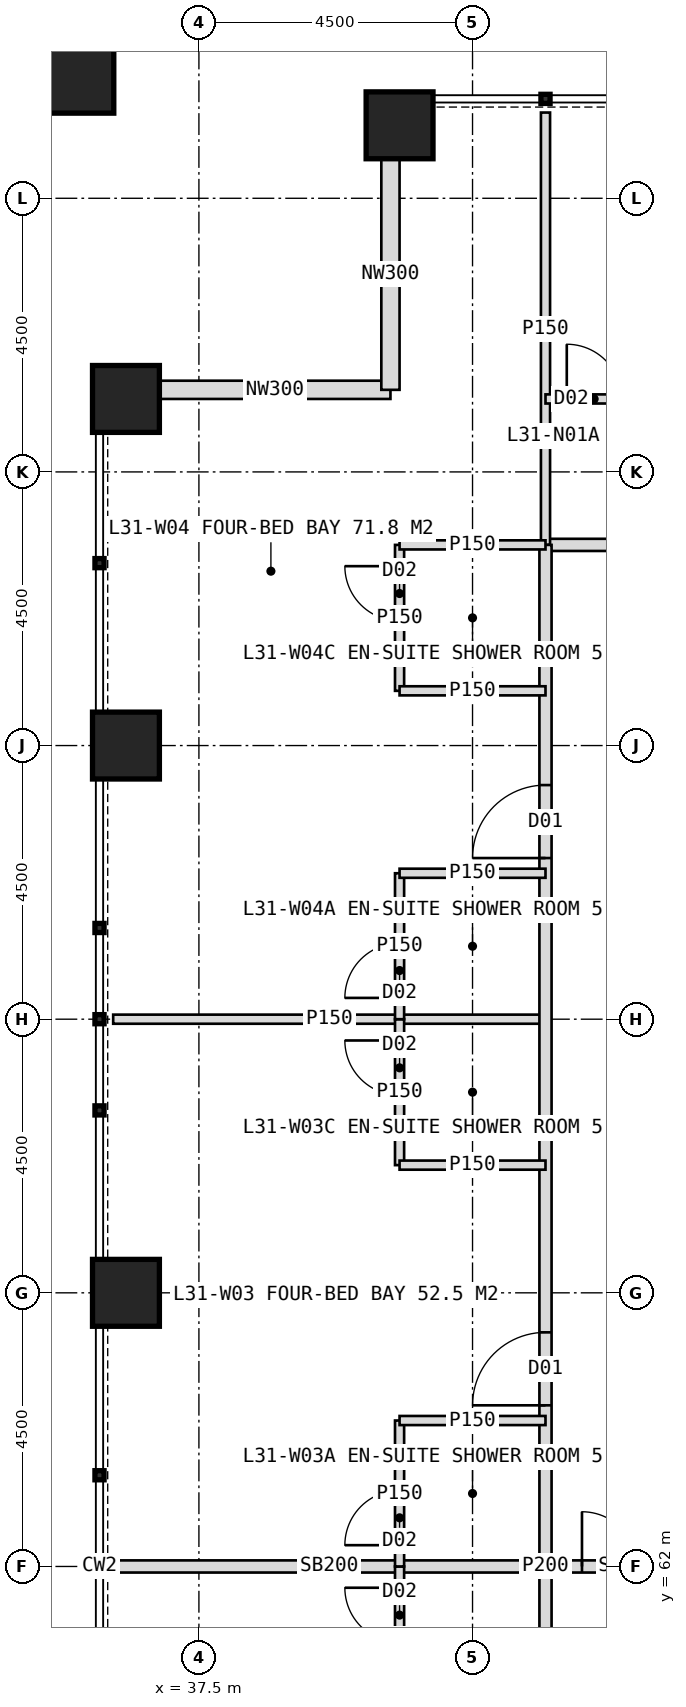
"""IFC4 building model, lengths in metres.
Left out: names, types, materials, properties, quantities, classifications, styles, units other than length and angle.
Written with IfcOpenShell. Run it as: python <this file> out.ifc"""

import sys

from ifc_helpers import new_model, si_unit, direction, frame, frame_2d, origin, origin_2d, place, context, subcontext, project, spatial, rectangle, hollow_rectangle, extrude, element, fill, save


model = new_model("IFC4")
c1 = context("Model", 3, precision=1e-05, world=origin(), true_north=direction((0.0, 1.0)))
c2 = subcontext(c1, "Body", "Model", "MODEL_VIEW")
j1 = project(units=[si_unit("LENGTHUNIT", "METRE"), si_unit("PLANEANGLEUNIT", "RADIAN")], contexts=[c1])
p1 = place(None, origin())
s1 = spatial("IfcSite", under=j1, at=p1, CompositionType="ELEMENT")
p2 = place(p1, origin())
s2 = spatial("IfcBuilding", under=s1, at=p2, CompositionType="ELEMENT")
p3 = place(p2, frame((0.0, 0.0, 132.0)))
s3 = spatial("IfcBuildingStorey", under=s2, at=p3, CompositionType="ELEMENT", Elevation=132.0)
for number, where, z_axis, x_axis in (
    (1, (40.8, 85.7, 0.0), (0.0, 0.0, 1.0), (1.0, 0.0, 0.0)),
    (2, (36.3, 66.5, 0.0), (0.0, 0.0, 1.0), (1.0, 0.0, 0.0)),
    (3, (36.3, 75.5, 0.0), (0.0, 0.0, 1.0), (1.0, 0.0, 0.0)),
    (4, (36.3, 81.2, 0.0), (0.0, 0.0, 1.0), (1.0, 0.0, 0.0)),
):
    element("IfcColumn", number, at=place(p3, frame(where, z_axis=z_axis, x_axis=x_axis)), inside=s3, PredefinedType="COLUMN", context=c2, shape_type="SweptSolid", body=[
        extrude(hollow_rectangle(XDim=1.1, YDim=1.1, WallThickness=0.1, at=origin_2d()), origin(), (0.0, 0.0, 1.0), 4.0),
    ])
p4 = place(p3, frame((35.4, 86.6, 0.0), z_axis=(0.0, 0.0, 1.0), x_axis=(1.0, 0.0, 0.0)))
e5 = element("IfcColumn", 5, at=p4, inside=s3, PredefinedType="COLUMN", context=c2, shape_type="SweptSolid", body=[
    extrude(hollow_rectangle(XDim=1.4, YDim=1.4, WallThickness=0.08, at=origin_2d()), origin(), (0.0, 0.0, 1.0), 4.0),
])
for number, where, z_axis, x_axis in (
    (6, (36.85, 81.35, 0.0), (0.0, 0.0, 1.0), (1.0, 0.0, 0.0)),
    (7, (40.65, 81.35, 0.0), (0.0, 0.0, 1.0), (0.0, 1.0, 0.0)),
):
    element("IfcWall", number, at=place(p3, frame(where, z_axis=z_axis, x_axis=x_axis)), inside=s3, PredefinedType="ELEMENTEDWALL", context=c2, shape_type="SweptSolid", body=[
        extrude(rectangle(XDim=3.8, YDim=0.3, at=frame_2d((1.9, 0.0))), origin(), (0.0, 0.0, 1.0), 4.0),
    ])
p5 = place(p3, frame((43.2, 78.8, 0.0), z_axis=(0.0, 0.0, 1.0), x_axis=(1.0, 0.0, 0.0)))
e8 = element("IfcWall", 8, at=p5, inside=s3, PredefinedType="PARTITIONING", context=c2, shape_type="SweptSolid", body=[
    extrude(rectangle(XDim=33.6, YDim=0.2, at=frame_2d((16.8, 0.0))), origin(), (0.0, 0.0, 1.0), 3.75),
])
p6 = place(p5, frame((3.25, 0.0, 0.0)))
e9 = element("IfcOpeningElement", 9, at=p6, cuts=e8, PredefinedType="OPENING", context=c2, shape_type="SweptSolid", body=[
    extrude(rectangle(XDim=1.2, YDim=2.2, at=frame_2d((0.6, 1.1))), frame((0.0, 0.11, 0.0), z_axis=(0.0, -1.0, 0.0), x_axis=(1.0, 0.0, 0.0)), (0.0, 0.0, 1.0), 0.22),
])
p7 = place(p5, frame((12.55, 0.0, 0.0)))
e10 = element("IfcOpeningElement", 10, at=p7, cuts=e8, PredefinedType="OPENING", context=c2, shape_type="SweptSolid", body=[
    extrude(rectangle(XDim=1.2, YDim=2.2, at=frame_2d((0.6, 1.1))), frame((0.0, 0.11, 0.0), z_axis=(0.0, -1.0, 0.0), x_axis=(1.0, 0.0, 0.0)), (0.0, 0.0, 1.0), 0.22),
])
p8 = place(p5, frame((26.95, 0.0, 0.0)))
e11 = element("IfcOpeningElement", 11, at=p8, cuts=e8, PredefinedType="OPENING", context=c2, shape_type="SweptSolid", body=[
    extrude(rectangle(XDim=1.2, YDim=2.2, at=frame_2d((0.6, 1.1))), frame((0.0, 0.11, 0.0), z_axis=(0.0, -1.0, 0.0), x_axis=(1.0, 0.0, 0.0)), (0.0, 0.0, 1.0), 0.22),
])
p9 = place(p3, frame((43.2, 78.8, 0.0), z_axis=(0.0, 0.0, 1.0), x_axis=(0.0, 1.0, 0.0)))
e12 = element("IfcWall", 12, at=p9, inside=s3, PredefinedType="PARTITIONING", context=c2, shape_type="SweptSolid", body=[
    extrude(rectangle(XDim=7.11, YDim=0.15, at=frame_2d((3.555, 0.0))), origin(), (0.0, 0.0, 1.0), 3.75),
])
p10 = place(p3, frame((43.2, 81.2, 0.0), z_axis=(0.0, 0.0, 1.0), x_axis=(1.0, 0.0, 0.0)))
e13 = element("IfcWall", 13, at=p10, inside=s3, PredefinedType="PARTITIONING", context=c2, shape_type="SweptSolid", body=[
    extrude(rectangle(XDim=3.0, YDim=0.15, at=frame_2d((1.5, 0.0))), origin(), (0.0, 0.0, 1.0), 2.997),
])
p11 = place(p10, frame((0.35, 0.0, 0.0)))
e14 = element("IfcOpeningElement", 14, at=p11, cuts=e13, PredefinedType="OPENING", context=c2, shape_type="SweptSolid", body=[
    extrude(rectangle(XDim=0.9, YDim=2.1, at=frame_2d((0.45, 1.05))), frame((0.0, 0.085, 0.0), z_axis=(0.0, -1.0, 0.0), x_axis=(1.0, 0.0, 0.0)), (0.0, 0.0, 1.0), 0.17),
])
p12 = place(p3, frame((43.2, 62.0, 0.0), z_axis=(0.0, 0.0, 1.0), x_axis=(-1.0, 0.0, 0.0)))
e15 = element("IfcWall", 15, at=p12, inside=s3, PredefinedType="SOLIDWALL", context=c2, shape_type="SweptSolid", body=[
    extrude(rectangle(XDim=7.11, YDim=0.2, at=frame_2d((3.555, 0.0))), origin(), (0.0, 0.0, 1.0), 2.95),
])
p13 = place(p3, frame((43.2, 71.0, 0.0), z_axis=(0.0, 0.0, 1.0), x_axis=(-1.0, 0.0, 0.0)))
e16 = element("IfcWall", 16, at=p13, inside=s3, PredefinedType="PARTITIONING", context=c2, shape_type="SweptSolid", body=[
    extrude(rectangle(XDim=7.11, YDim=0.15, at=frame_2d((3.555, 0.0))), origin(), (0.0, 0.0, 1.0), 3.75),
])
p14 = place(p3, frame((43.2, 45.2, 0.0), z_axis=(0.0, 0.0, 1.0), x_axis=(0.0, 1.0, 0.0)))
e17 = element("IfcWall", 17, at=p14, inside=s3, PredefinedType="PARTITIONING", context=c2, shape_type="SweptSolid", body=[
    extrude(rectangle(XDim=33.6, YDim=0.2, at=frame_2d((16.8, 0.0))), origin(), (0.0, 0.0, 1.0), 3.75),
])
p15 = place(p14, frame((2.65, 0.0, 0.0)))
e18 = element("IfcOpeningElement", 18, at=p15, cuts=e17, PredefinedType="OPENING", context=c2, shape_type="SweptSolid", body=[
    extrude(rectangle(XDim=1.2, YDim=2.2, at=frame_2d((0.6, 1.1))), frame((0.0, 0.11, 0.0), z_axis=(0.0, -1.0, 0.0), x_axis=(1.0, 0.0, 0.0)), (0.0, 0.0, 1.0), 0.22),
])
p16 = place(p14, frame((8.95, 0.0, 0.0)))
e19 = element("IfcOpeningElement", 19, at=p16, cuts=e17, PredefinedType="OPENING", context=c2, shape_type="SweptSolid", body=[
    extrude(rectangle(XDim=1.2, YDim=2.2, at=frame_2d((0.6, 1.1))), frame((0.0, 0.11, 0.0), z_axis=(0.0, -1.0, 0.0), x_axis=(1.0, 0.0, 0.0)), (0.0, 0.0, 1.0), 0.22),
])
p17 = place(p14, frame((19.45, 0.0, 0.0)))
e20 = element("IfcOpeningElement", 20, at=p17, cuts=e17, PredefinedType="OPENING", context=c2, shape_type="SweptSolid", body=[
    extrude(rectangle(XDim=1.2, YDim=2.2, at=frame_2d((0.6, 1.1))), frame((0.0, 0.11, 0.0), z_axis=(0.0, -1.0, 0.0), x_axis=(1.0, 0.0, 0.0)), (0.0, 0.0, 1.0), 0.22),
])
p18 = place(p14, frame((28.45, 0.0, 0.0)))
e21 = element("IfcOpeningElement", 21, at=p18, cuts=e17, PredefinedType="OPENING", context=c2, shape_type="SweptSolid", body=[
    extrude(rectangle(XDim=1.2, YDim=2.2, at=frame_2d((0.6, 1.1))), frame((0.0, 0.11, 0.0), z_axis=(0.0, -1.0, 0.0), x_axis=(1.0, 0.0, 0.0)), (0.0, 0.0, 1.0), 0.22),
])
p19 = place(p3, frame((40.8, 59.6, 0.0), z_axis=(0.0, 0.0, 1.0), x_axis=(0.0, 1.0, 0.0)))
e22 = element("IfcWall", 22, at=p19, inside=s3, PredefinedType="PARTITIONING", context=c2, shape_type="SweptSolid", body=[
    extrude(rectangle(XDim=2.4, YDim=0.15, at=frame_2d((1.2, 0.0))), origin(), (0.0, 0.0, 1.0), 3.75),
])
p20 = place(p19, frame((1.15, 0.0, 0.0)))
e23 = element("IfcOpeningElement", 23, at=p20, cuts=e22, PredefinedType="OPENING", context=c2, shape_type="SweptSolid", body=[
    extrude(rectangle(XDim=0.9, YDim=2.1, at=frame_2d((0.45, 1.05))), frame((0.0, 0.085, 0.0), z_axis=(0.0, -1.0, 0.0), x_axis=(1.0, 0.0, 0.0)), (0.0, 0.0, 1.0), 0.17),
])
p21 = place(p3, frame((40.8, 62.0, 0.0), z_axis=(0.0, 0.0, 1.0), x_axis=(0.0, 1.0, 0.0)))
e24 = element("IfcWall", 24, at=p21, inside=s3, PredefinedType="PARTITIONING", context=c2, shape_type="SweptSolid", body=[
    extrude(rectangle(XDim=2.4, YDim=0.15, at=frame_2d((1.2, 0.0))), origin(), (0.0, 0.0, 1.0), 3.75),
])
p22 = place(p21, frame((0.35, 0.0, 0.0)))
e25 = element("IfcOpeningElement", 25, at=p22, cuts=e24, PredefinedType="OPENING", context=c2, shape_type="SweptSolid", body=[
    extrude(rectangle(XDim=0.9, YDim=2.1, at=frame_2d((0.45, 1.05))), frame((0.0, 0.085, 0.0), z_axis=(0.0, -1.0, 0.0), x_axis=(1.0, 0.0, 0.0)), (0.0, 0.0, 1.0), 0.17),
])
p23 = place(p3, frame((43.2, 64.4, 0.0), z_axis=(0.0, 0.0, 1.0), x_axis=(-1.0, 0.0, 0.0)))
e26 = element("IfcWall", 26, at=p23, inside=s3, PredefinedType="PARTITIONING", context=c2, shape_type="SweptSolid", body=[
    extrude(rectangle(XDim=2.4, YDim=0.15, at=frame_2d((1.2, 0.0))), origin(), (0.0, 0.0, 1.0), 3.75),
])
p24 = place(p3, frame((40.8, 68.6, 0.0), z_axis=(0.0, 0.0, 1.0), x_axis=(0.0, 1.0, 0.0)))
e27 = element("IfcWall", 27, at=p24, inside=s3, PredefinedType="PARTITIONING", context=c2, shape_type="SweptSolid", body=[
    extrude(rectangle(XDim=2.4, YDim=0.15, at=frame_2d((1.2, 0.0))), origin(), (0.0, 0.0, 1.0), 3.75),
])
p25 = place(p24, frame((1.15, 0.0, 0.0)))
e28 = element("IfcOpeningElement", 28, at=p25, cuts=e27, PredefinedType="OPENING", context=c2, shape_type="SweptSolid", body=[
    extrude(rectangle(XDim=0.9, YDim=2.1, at=frame_2d((0.45, 1.05))), frame((0.0, 0.085, 0.0), z_axis=(0.0, -1.0, 0.0), x_axis=(1.0, 0.0, 0.0)), (0.0, 0.0, 1.0), 0.17),
])
p26 = place(p3, frame((43.2, 68.6, 0.0), z_axis=(0.0, 0.0, 1.0), x_axis=(-1.0, 0.0, 0.0)))
e29 = element("IfcWall", 29, at=p26, inside=s3, PredefinedType="PARTITIONING", context=c2, shape_type="SweptSolid", body=[
    extrude(rectangle(XDim=2.4, YDim=0.15, at=frame_2d((1.2, 0.0))), origin(), (0.0, 0.0, 1.0), 3.75),
])
p27 = place(p3, frame((40.8, 71.0, 0.0), z_axis=(0.0, 0.0, 1.0), x_axis=(0.0, 1.0, 0.0)))
e30 = element("IfcWall", 30, at=p27, inside=s3, PredefinedType="PARTITIONING", context=c2, shape_type="SweptSolid", body=[
    extrude(rectangle(XDim=2.4, YDim=0.15, at=frame_2d((1.2, 0.0))), origin(), (0.0, 0.0, 1.0), 3.75),
])
p28 = place(p27, frame((0.35, 0.0, 0.0)))
e31 = element("IfcOpeningElement", 31, at=p28, cuts=e30, PredefinedType="OPENING", context=c2, shape_type="SweptSolid", body=[
    extrude(rectangle(XDim=0.9, YDim=2.1, at=frame_2d((0.45, 1.05))), frame((0.0, 0.085, 0.0), z_axis=(0.0, -1.0, 0.0), x_axis=(1.0, 0.0, 0.0)), (0.0, 0.0, 1.0), 0.17),
])
p29 = place(p3, frame((43.2, 73.4, 0.0), z_axis=(0.0, 0.0, 1.0), x_axis=(-1.0, 0.0, 0.0)))
e32 = element("IfcWall", 32, at=p29, inside=s3, PredefinedType="PARTITIONING", context=c2, shape_type="SweptSolid", body=[
    extrude(rectangle(XDim=2.4, YDim=0.15, at=frame_2d((1.2, 0.0))), origin(), (0.0, 0.0, 1.0), 3.75),
])
p30 = place(p3, frame((40.8, 76.4, 0.0), z_axis=(0.0, 0.0, 1.0), x_axis=(0.0, 1.0, 0.0)))
e33 = element("IfcWall", 33, at=p30, inside=s3, PredefinedType="PARTITIONING", context=c2, shape_type="SweptSolid", body=[
    extrude(rectangle(XDim=2.4, YDim=0.15, at=frame_2d((1.2, 0.0))), origin(), (0.0, 0.0, 1.0), 2.997),
])
p31 = place(p30, frame((1.15, 0.0, 0.0)))
e34 = element("IfcOpeningElement", 34, at=p31, cuts=e33, PredefinedType="OPENING", context=c2, shape_type="SweptSolid", body=[
    extrude(rectangle(XDim=0.9, YDim=2.1, at=frame_2d((0.45, 1.05))), frame((0.0, 0.085, 0.0), z_axis=(0.0, -1.0, 0.0), x_axis=(1.0, 0.0, 0.0)), (0.0, 0.0, 1.0), 0.17),
])
for number, where, z_axis, x_axis in (
    (35, (43.2, 76.4, 0.0), (0.0, 0.0, 1.0), (-1.0, 0.0, 0.0)),
    (36, (43.2, 78.8, 0.0), (0.0, 0.0, 1.0), (-1.0, 0.0, 0.0)),
):
    element("IfcWall", number, at=place(p3, frame(where, z_axis=z_axis, x_axis=x_axis)), inside=s3, PredefinedType="PARTITIONING", context=c2, shape_type="SweptSolid", body=[
        extrude(rectangle(XDim=2.4, YDim=0.15, at=frame_2d((1.2, 0.0))), origin(), (0.0, 0.0, 1.0), 3.75),
    ])
p32 = place(p3, frame((45.9, 62.0, 0.0), z_axis=(0.0, 0.0, 1.0), x_axis=(-1.0, 0.0, 0.0)))
e37 = element("IfcWall", 37, at=p32, inside=s3, PredefinedType="SOLIDWALL", context=c2, shape_type="SweptSolid", body=[
    extrude(rectangle(XDim=2.7, YDim=0.2, at=frame_2d((1.35, 0.0))), origin(), (0.0, 0.0, 1.0), 2.95),
])
p33 = place(p32, frame((0.3, 0.0, 0.0)))
e38 = element("IfcOpeningElement", 38, at=p33, cuts=e37, PredefinedType="OPENING", context=c2, shape_type="SweptSolid", body=[
    extrude(rectangle(XDim=1.8, YDim=2.2, at=frame_2d((0.9, 1.1))), frame((0.0, 0.11, 0.0), z_axis=(0.0, -1.0, 0.0), x_axis=(1.0, 0.0, 0.0)), (0.0, 0.0, 1.0), 0.22),
])
p34 = place(p11, origin())
e39 = element("IfcDoor", 39, at=p34, inside=s3, OperationType="SINGLE_SWING_LEFT", PredefinedType="DOOR", context=c2, shape_type="SweptSolid", body=[
    extrude(rectangle(XDim=0.9, YDim=2.1, at=frame_2d((0.45, 1.05))), frame((0.0, 0.025, 0.0), z_axis=(0.0, -1.0, 0.0), x_axis=(1.0, 0.0, 0.0)), (0.0, 0.0, 1.0), 0.05),
])
fill(e14, e39)
p35 = place(p20, origin())
e40 = element("IfcDoor", 40, at=p35, inside=s3, OperationType="SINGLE_SWING_RIGHT", PredefinedType="DOOR", context=c2, shape_type="SweptSolid", body=[
    extrude(rectangle(XDim=0.9, YDim=2.1, at=frame_2d((0.45, 1.05))), frame((0.0, 0.025, 0.0), z_axis=(0.0, -1.0, 0.0), x_axis=(1.0, 0.0, 0.0)), (0.0, 0.0, 1.0), 0.05),
])
fill(e23, e40)
p36 = place(p17, origin())
e41 = element("IfcDoor", 41, at=p36, inside=s3, OperationType="SINGLE_SWING_LEFT", PredefinedType="DOOR", context=c2, shape_type="SweptSolid", body=[
    extrude(rectangle(XDim=1.2, YDim=2.2, at=frame_2d((0.6, 1.1))), frame((0.0, 0.025, 0.0), z_axis=(0.0, -1.0, 0.0), x_axis=(1.0, 0.0, 0.0)), (0.0, 0.0, 1.0), 0.05),
])
fill(e20, e41)
p37 = place(p22, origin())
e42 = element("IfcDoor", 42, at=p37, inside=s3, OperationType="SINGLE_SWING_LEFT", PredefinedType="DOOR", context=c2, shape_type="SweptSolid", body=[
    extrude(rectangle(XDim=0.9, YDim=2.1, at=frame_2d((0.45, 1.05))), frame((0.0, 0.025, 0.0), z_axis=(0.0, -1.0, 0.0), x_axis=(1.0, 0.0, 0.0)), (0.0, 0.0, 1.0), 0.05),
])
fill(e25, e42)
p38 = place(p25, origin())
e43 = element("IfcDoor", 43, at=p38, inside=s3, OperationType="SINGLE_SWING_RIGHT", PredefinedType="DOOR", context=c2, shape_type="SweptSolid", body=[
    extrude(rectangle(XDim=0.9, YDim=2.1, at=frame_2d((0.45, 1.05))), frame((0.0, 0.025, 0.0), z_axis=(0.0, -1.0, 0.0), x_axis=(1.0, 0.0, 0.0)), (0.0, 0.0, 1.0), 0.05),
])
fill(e28, e43)
p39 = place(p18, origin())
e44 = element("IfcDoor", 44, at=p39, inside=s3, OperationType="SINGLE_SWING_LEFT", PredefinedType="DOOR", context=c2, shape_type="SweptSolid", body=[
    extrude(rectangle(XDim=1.2, YDim=2.2, at=frame_2d((0.6, 1.1))), frame((0.0, 0.025, 0.0), z_axis=(0.0, -1.0, 0.0), x_axis=(1.0, 0.0, 0.0)), (0.0, 0.0, 1.0), 0.05),
])
fill(e21, e44)
p40 = place(p28, origin())
e45 = element("IfcDoor", 45, at=p40, inside=s3, OperationType="SINGLE_SWING_LEFT", PredefinedType="DOOR", context=c2, shape_type="SweptSolid", body=[
    extrude(rectangle(XDim=0.9, YDim=2.1, at=frame_2d((0.45, 1.05))), frame((0.0, 0.025, 0.0), z_axis=(0.0, -1.0, 0.0), x_axis=(1.0, 0.0, 0.0)), (0.0, 0.0, 1.0), 0.05),
])
fill(e31, e45)
p41 = place(p31, origin())
e46 = element("IfcDoor", 46, at=p41, inside=s3, OperationType="SINGLE_SWING_RIGHT", PredefinedType="DOOR", context=c2, shape_type="SweptSolid", body=[
    extrude(rectangle(XDim=0.9, YDim=2.1, at=frame_2d((0.45, 1.05))), frame((0.0, 0.025, 0.0), z_axis=(0.0, -1.0, 0.0), x_axis=(1.0, 0.0, 0.0)), (0.0, 0.0, 1.0), 0.05),
])
fill(e34, e46)
p42 = place(p33, origin())
e47 = element("IfcDoor", 47, at=p42, inside=s3, OperationType="DOUBLE_DOOR_DOUBLE_SWING", PredefinedType="DOOR", context=c2, shape_type="SweptSolid", body=[
    extrude(rectangle(XDim=1.8, YDim=2.2, at=frame_2d((0.9, 1.1))), frame((0.0, 0.025, 0.0), z_axis=(0.0, -1.0, 0.0), x_axis=(1.0, 0.0, 0.0)), (0.0, 0.0, 1.0), 0.05),
])
fill(e38, e47)
save(model, sys.argv[1])
